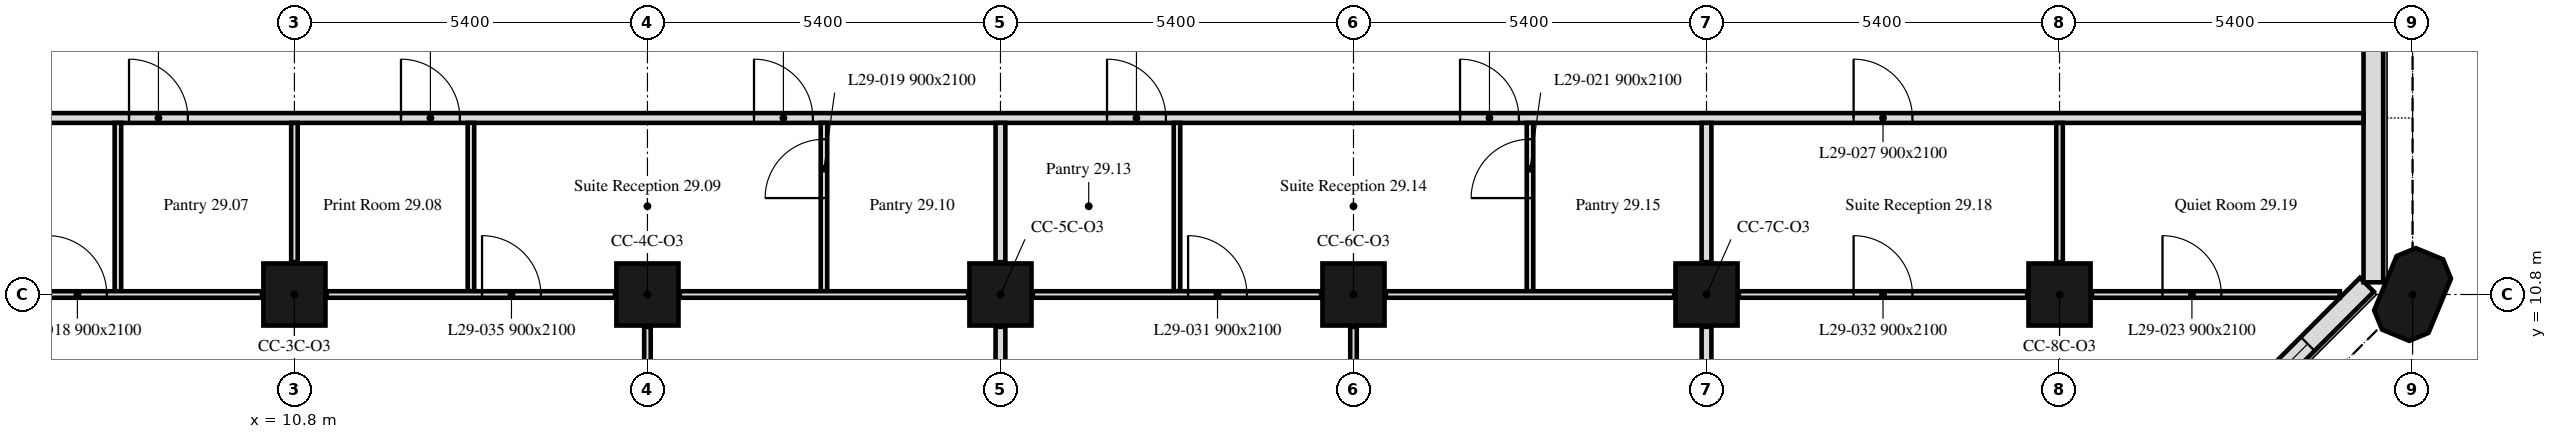
"""IFC4 building model, lengths in metres.
Left out: names, types, materials, properties, quantities, classifications, styles, units other than length and angle.
Written with IfcOpenShell. Run it as: python <this file> out.ifc"""

import sys

from ifc_helpers import new_model, si_unit, direction, frame, frame_2d, origin, origin_2d, place, context, subcontext, project, spatial, polyline, rectangle, outline, extrude, element, fill, save


model = new_model("IFC4")
c1 = context("Model", 3, precision=1e-05, world=origin(), true_north=direction((0.0, 1.0)))
c2 = subcontext(c1, "Body", "Model", "MODEL_VIEW")
j1 = project(units=[si_unit("LENGTHUNIT", "METRE"), si_unit("PLANEANGLEUNIT", "RADIAN")], contexts=[c1])
p1 = place(None, origin())
s1 = spatial("IfcSite", under=j1, at=p1, CompositionType="ELEMENT")
p2 = place(p1, origin())
s2 = spatial("IfcBuilding", under=s1, at=p2, CompositionType="ELEMENT")
p3 = place(p2, frame((0.0, 0.0, 122.0)))
s3 = spatial("IfcBuildingStorey", under=s2, at=p3, CompositionType="ELEMENT", Elevation=122.0)
for number, where, z_axis, x_axis in (
    (1, (10.8, 10.8, 0.0), (0.0, 0.0, 1.0), (1.0, 0.0, 0.0)),
    (2, (16.2, 10.8, 0.0), (0.0, 0.0, 1.0), (1.0, 0.0, 0.0)),
    (3, (21.6, 10.8, 0.0), (0.0, 0.0, 1.0), (1.0, 0.0, 0.0)),
    (4, (27.0, 10.8, 0.0), (0.0, 0.0, 1.0), (1.0, 0.0, 0.0)),
    (5, (32.4, 10.8, 0.0), (0.0, 0.0, 1.0), (1.0, 0.0, 0.0)),
    (6, (37.8, 10.8, 0.0), (0.0, 0.0, 1.0), (1.0, 0.0, 0.0)),
):
    element("IfcColumn", number, at=place(p3, frame(where, z_axis=z_axis, x_axis=x_axis)), inside=s3, PredefinedType="COLUMN", context=c2, shape_type="SweptSolid", body=[
        extrude(rectangle(XDim=0.95, YDim=0.95, at=origin_2d()), origin(), (0.0, 0.0, 1.0), 3.3),
    ])
p4 = place(p3, frame((43.2, 10.8, 0.0), z_axis=(0.0, 0.0, 1.0), x_axis=(0.382683432365, 0.923879532511, 0.0)))
e7 = element("IfcColumn", 7, at=p4, inside=s3, PredefinedType="COLUMN", context=c2, shape_type="SweptSolid", body=[
    extrude(outline(polyline([(-0.45, -0.45), (0.45, -0.45), (0.675, -0.225), (0.675, 0.225), (0.45, 0.45), (-0.45, 0.45), (-0.675, 0.225), (-0.675, -0.225), (-0.45, -0.45)])), origin(), (0.0, 0.0, 1.0), 3.3),
])
p5 = place(p3, frame((37.65, 6.099, 0.0), z_axis=(0.0, 0.0, 1.0), x_axis=(0.707106781187, 0.707106781187, 0.0)))
e8 = element("IfcWall", 8, at=p5, inside=s3, PredefinedType="SOLIDWALL", context=c2, shape_type="SweptSolid", body=[
    extrude(rectangle(XDim=6.86, YDim=0.3, at=frame_2d((3.43, 0.0))), origin(), (0.0, 0.0, 1.0), 3.3),
])
p6 = place(p5, frame((1.28, 0.0, 0.9)))
e9 = element("IfcOpeningElement", 9, at=p6, cuts=e8, PredefinedType="OPENING", context=c2, shape_type="SweptSolid", body=[
    extrude(rectangle(XDim=1.1, YDim=1.7, at=frame_2d((0.55, 0.85))), frame((0.0, 0.16, 0.0), z_axis=(0.0, -1.0, 0.0), x_axis=(1.0, 0.0, 0.0)), (0.0, 0.0, 1.0), 0.32),
])
p7 = place(p5, frame((4.48, 0.0, 0.9)))
e10 = element("IfcOpeningElement", 10, at=p7, cuts=e8, PredefinedType="OPENING", context=c2, shape_type="SweptSolid", body=[
    extrude(rectangle(XDim=1.1, YDim=1.7, at=frame_2d((0.55, 0.85))), frame((0.0, 0.16, 0.0), z_axis=(0.0, -1.0, 0.0), x_axis=(1.0, 0.0, 0.0)), (0.0, 0.0, 1.0), 0.32),
])
p8 = place(p3, frame((42.6, 10.986, 0.0), z_axis=(0.0, 0.0, 1.0), x_axis=(0.0, 1.0, 0.0)))
e11 = element("IfcWall", 11, at=p8, inside=s3, PredefinedType="SOLIDWALL", context=c2, shape_type="SweptSolid", body=[
    extrude(rectangle(XDim=5.214, YDim=0.3, at=frame_2d((2.607, 0.0))), origin(), (0.0, 0.0, 1.0), 3.3),
])
p9 = place(p3, frame((0.751, 13.5, 0.0), z_axis=(0.0, 0.0, 1.0), x_axis=(1.0, 0.0, 0.0)))
e12 = element("IfcWall", 12, at=p9, inside=s3, PredefinedType="PARTITIONING", context=c2, shape_type="SweptSolid", body=[
    extrude(rectangle(XDim=41.698, YDim=0.15, at=frame_2d((20.849, 0.0))), origin(), (0.0, 0.0, 1.0), 2.55),
])
p10 = place(p9, frame((0.879, 0.0, 0.0)))
e13 = element("IfcOpeningElement", 13, at=p10, cuts=e12, PredefinedType="OPENING", context=c2, shape_type="SweptSolid", body=[
    extrude(rectangle(XDim=0.9, YDim=2.1, at=frame_2d((0.45, 1.05))), frame((0.0, 0.075, 0.0), z_axis=(0.0, -1.0, 0.0), x_axis=(1.0, 0.0, 0.0)), (0.0, 0.0, 1.0), 0.15),
])
p11 = place(p9, frame((7.519, 0.0, 0.0)))
e14 = element("IfcOpeningElement", 14, at=p11, cuts=e12, PredefinedType="OPENING", context=c2, shape_type="SweptSolid", body=[
    extrude(rectangle(XDim=0.9, YDim=2.1, at=frame_2d((0.45, 1.05))), frame((0.0, 0.075, 0.0), z_axis=(0.0, -1.0, 0.0), x_axis=(1.0, 0.0, 0.0)), (0.0, 0.0, 1.0), 0.15),
])
p12 = place(p9, frame((11.679, 0.0, 0.0)))
e15 = element("IfcOpeningElement", 15, at=p12, cuts=e12, PredefinedType="OPENING", context=c2, shape_type="SweptSolid", body=[
    extrude(rectangle(XDim=0.9, YDim=2.1, at=frame_2d((0.45, 1.05))), frame((0.0, 0.075, 0.0), z_axis=(0.0, -1.0, 0.0), x_axis=(1.0, 0.0, 0.0)), (0.0, 0.0, 1.0), 0.15),
])
p13 = place(p9, frame((22.479, 0.0, 0.0)))
e16 = element("IfcOpeningElement", 16, at=p13, cuts=e12, PredefinedType="OPENING", context=c2, shape_type="SweptSolid", body=[
    extrude(rectangle(XDim=0.9, YDim=2.1, at=frame_2d((0.45, 1.05))), frame((0.0, 0.075, 0.0), z_axis=(0.0, -1.0, 0.0), x_axis=(1.0, 0.0, 0.0)), (0.0, 0.0, 1.0), 0.15),
])
p14 = place(p9, frame((33.899, 0.0, 0.0)))
e17 = element("IfcOpeningElement", 17, at=p14, cuts=e12, PredefinedType="OPENING", context=c2, shape_type="SweptSolid", body=[
    extrude(rectangle(XDim=0.9, YDim=2.1, at=frame_2d((0.45, 1.05))), frame((0.0, 0.075, 0.0), z_axis=(0.0, -1.0, 0.0), x_axis=(1.0, 0.0, 0.0)), (0.0, 0.0, 1.0), 0.15),
])
p15 = place(p9, frame((17.079, 0.0, 0.0)))
e18 = element("IfcOpeningElement", 18, at=p15, cuts=e12, PredefinedType="OPENING", context=c2, shape_type="SweptSolid", body=[
    extrude(rectangle(XDim=0.9, YDim=2.1, at=frame_2d((0.45, 1.05))), frame((0.0, 0.075, 0.0), z_axis=(0.0, -1.0, 0.0), x_axis=(1.0, 0.0, 0.0)), (0.0, 0.0, 1.0), 0.15),
])
p16 = place(p9, frame((27.879, 0.0, 0.0)))
e19 = element("IfcOpeningElement", 19, at=p16, cuts=e12, PredefinedType="OPENING", context=c2, shape_type="SweptSolid", body=[
    extrude(rectangle(XDim=0.9, YDim=2.1, at=frame_2d((0.45, 1.05))), frame((0.0, 0.075, 0.0), z_axis=(0.0, -1.0, 0.0), x_axis=(1.0, 0.0, 0.0)), (0.0, 0.0, 1.0), 0.15),
])
p17 = place(p3, frame((8.1, 10.85, 0.0), z_axis=(0.0, 0.0, 1.0), x_axis=(0.0, 1.0, 0.0)))
e20 = element("IfcWall", 20, at=p17, inside=s3, PredefinedType="PARTITIONING", context=c2, shape_type="SweptSolid", body=[
    extrude(rectangle(XDim=2.575, YDim=0.1, at=frame_2d((1.288, 0.0))), origin(), (0.0, 0.0, 1.0), 3.3),
])
p18 = place(p3, frame((5.895, 10.8, 0.0), z_axis=(0.0, 0.0, 1.0), x_axis=(1.0, 0.0, 0.0)))
e21 = element("IfcWall", 21, at=p18, inside=s3, PredefinedType="PARTITIONING", context=c2, shape_type="SweptSolid", body=[
    extrude(rectangle(XDim=4.41, YDim=0.1, at=frame_2d((2.205, 0.0))), origin(), (0.0, 0.0, 1.0), 2.55),
])
p19 = place(p18, frame((1.135, 0.0, 0.0)))
e22 = element("IfcOpeningElement", 22, at=p19, cuts=e21, PredefinedType="OPENING", context=c2, shape_type="SweptSolid", body=[
    extrude(rectangle(XDim=0.9, YDim=2.1, at=frame_2d((0.45, 1.05))), frame((0.0, 0.05, 0.0), z_axis=(0.0, -1.0, 0.0), x_axis=(1.0, 0.0, 0.0)), (0.0, 0.0, 1.0), 0.1),
])
p20 = place(p3, frame((10.8, 11.295, 0.0), z_axis=(0.0, 0.0, 1.0), x_axis=(0.0, 1.0, 0.0)))
e23 = element("IfcWall", 23, at=p20, inside=s3, PredefinedType="PARTITIONING", context=c2, shape_type="SweptSolid", body=[
    extrude(rectangle(XDim=2.13, YDim=0.1, at=frame_2d((1.065, 0.0))), origin(), (0.0, 0.0, 1.0), 2.55),
])
p21 = place(p3, frame((13.5, 10.85, 0.0), z_axis=(0.0, 0.0, 1.0), x_axis=(0.0, 1.0, 0.0)))
e24 = element("IfcWall", 24, at=p21, inside=s3, PredefinedType="PARTITIONING", context=c2, shape_type="SweptSolid", body=[
    extrude(rectangle(XDim=2.575, YDim=0.1, at=frame_2d((1.288, 0.0))), origin(), (0.0, 0.0, 1.0), 3.3),
])
p22 = place(p3, frame((11.295, 10.8, 0.0), z_axis=(0.0, 0.0, 1.0), x_axis=(1.0, 0.0, 0.0)))
e25 = element("IfcWall", 25, at=p22, inside=s3, PredefinedType="PARTITIONING", context=c2, shape_type="SweptSolid", body=[
    extrude(rectangle(XDim=4.41, YDim=0.1, at=frame_2d((2.205, 0.0))), origin(), (0.0, 0.0, 1.0), 2.55),
])
p23 = place(p22, frame((2.375, 0.0, 0.0)))
e26 = element("IfcOpeningElement", 26, at=p23, cuts=e25, PredefinedType="OPENING", context=c2, shape_type="SweptSolid", body=[
    extrude(rectangle(XDim=0.9, YDim=2.1, at=frame_2d((0.45, 1.05))), frame((0.0, 0.05, 0.0), z_axis=(0.0, -1.0, 0.0), x_axis=(1.0, 0.0, 0.0)), (0.0, 0.0, 1.0), 0.1),
])
p24 = place(p3, frame((18.9, 10.85, 0.0), z_axis=(0.0, 0.0, 1.0), x_axis=(0.0, 1.0, 0.0)))
e27 = element("IfcWall", 27, at=p24, inside=s3, PredefinedType="PARTITIONING", context=c2, shape_type="SweptSolid", body=[
    extrude(rectangle(XDim=2.575, YDim=0.1, at=frame_2d((1.288, 0.0))), origin(), (0.0, 0.0, 1.0), 3.3),
])
p25 = place(p24, frame((1.425, 0.0, 0.0)))
e28 = element("IfcOpeningElement", 28, at=p25, cuts=e27, PredefinedType="OPENING", context=c2, shape_type="SweptSolid", body=[
    extrude(rectangle(XDim=0.9, YDim=2.1, at=frame_2d((0.45, 1.05))), frame((0.0, 0.05, 0.0), z_axis=(0.0, -1.0, 0.0), x_axis=(1.0, 0.0, 0.0)), (0.0, 0.0, 1.0), 0.1),
])
p26 = place(p3, frame((16.695, 10.8, 0.0), z_axis=(0.0, 0.0, 1.0), x_axis=(1.0, 0.0, 0.0)))
e29 = element("IfcWall", 29, at=p26, inside=s3, PredefinedType="PARTITIONING", context=c2, shape_type="SweptSolid", body=[
    extrude(rectangle(XDim=4.41, YDim=0.1, at=frame_2d((2.205, 0.0))), origin(), (0.0, 0.0, 1.0), 3.3),
])
p27 = place(p3, frame((21.6, 11.295, 0.0), z_axis=(0.0, 0.0, 1.0), x_axis=(0.0, 1.0, 0.0)))
e30 = element("IfcWall", 30, at=p27, inside=s3, PredefinedType="PARTITIONING", context=c2, shape_type="SweptSolid", body=[
    extrude(rectangle(XDim=2.13, YDim=0.15, at=frame_2d((1.065, 0.0))), origin(), (0.0, 0.0, 1.0), 2.55),
])
p28 = place(p3, frame((16.2, 6.151, 0.0), z_axis=(0.0, 0.0, 1.0), x_axis=(0.0, 1.0, 0.0)))
e31 = element("IfcWall", 31, at=p28, inside=s3, PredefinedType="PARTITIONING", context=c2, shape_type="SweptSolid", body=[
    extrude(rectangle(XDim=4.154, YDim=0.1, at=frame_2d((2.077, 0.0))), origin(), (0.0, 0.0, 1.0), 2.55),
])
p29 = place(p28, frame((1.724, 0.0, 0.0)))
e32 = element("IfcOpeningElement", 32, at=p29, cuts=e31, PredefinedType="OPENING", context=c2, shape_type="SweptSolid", body=[
    extrude(rectangle(XDim=0.9, YDim=2.1, at=frame_2d((0.45, 1.05))), frame((0.0, 0.05, 0.0), z_axis=(0.0, -1.0, 0.0), x_axis=(1.0, 0.0, 0.0)), (0.0, 0.0, 1.0), 0.1),
])
p30 = place(p3, frame((21.6, 6.151, 0.0), z_axis=(0.0, 0.0, 1.0), x_axis=(0.0, 1.0, 0.0)))
e33 = element("IfcWall", 33, at=p30, inside=s3, PredefinedType="PARTITIONING", context=c2, shape_type="SweptSolid", body=[
    extrude(rectangle(XDim=4.154, YDim=0.15, at=frame_2d((2.077, 0.0))), origin(), (0.0, 0.0, 1.0), 2.55),
])
p31 = place(p3, frame((24.3, 10.85, 0.0), z_axis=(0.0, 0.0, 1.0), x_axis=(0.0, 1.0, 0.0)))
e34 = element("IfcWall", 34, at=p31, inside=s3, PredefinedType="PARTITIONING", context=c2, shape_type="SweptSolid", body=[
    extrude(rectangle(XDim=2.575, YDim=0.1, at=frame_2d((1.288, 0.0))), origin(), (0.0, 0.0, 1.0), 3.3),
])
p32 = place(p3, frame((22.095, 10.8, 0.0), z_axis=(0.0, 0.0, 1.0), x_axis=(1.0, 0.0, 0.0)))
e35 = element("IfcWall", 35, at=p32, inside=s3, PredefinedType="PARTITIONING", context=c2, shape_type="SweptSolid", body=[
    extrude(rectangle(XDim=4.41, YDim=0.1, at=frame_2d((2.205, 0.0))), origin(), (0.0, 0.0, 1.0), 3.3),
])
p33 = place(p32, frame((2.375, 0.0, 0.0)))
e36 = element("IfcOpeningElement", 36, at=p33, cuts=e35, PredefinedType="OPENING", context=c2, shape_type="SweptSolid", body=[
    extrude(rectangle(XDim=0.9, YDim=2.1, at=frame_2d((0.45, 1.05))), frame((0.0, 0.05, 0.0), z_axis=(0.0, -1.0, 0.0), x_axis=(1.0, 0.0, 0.0)), (0.0, 0.0, 1.0), 0.1),
])
p34 = place(p3, frame((29.7, 10.85, 0.0), z_axis=(0.0, 0.0, 1.0), x_axis=(0.0, 1.0, 0.0)))
e37 = element("IfcWall", 37, at=p34, inside=s3, PredefinedType="PARTITIONING", context=c2, shape_type="SweptSolid", body=[
    extrude(rectangle(XDim=2.575, YDim=0.1, at=frame_2d((1.288, 0.0))), origin(), (0.0, 0.0, 1.0), 3.3),
])
p35 = place(p34, frame((1.425, 0.0, 0.0)))
e38 = element("IfcOpeningElement", 38, at=p35, cuts=e37, PredefinedType="OPENING", context=c2, shape_type="SweptSolid", body=[
    extrude(rectangle(XDim=0.9, YDim=2.1, at=frame_2d((0.45, 1.05))), frame((0.0, 0.05, 0.0), z_axis=(0.0, -1.0, 0.0), x_axis=(1.0, 0.0, 0.0)), (0.0, 0.0, 1.0), 0.1),
])
p36 = place(p3, frame((27.495, 10.8, 0.0), z_axis=(0.0, 0.0, 1.0), x_axis=(1.0, 0.0, 0.0)))
e39 = element("IfcWall", 39, at=p36, inside=s3, PredefinedType="PARTITIONING", context=c2, shape_type="SweptSolid", body=[
    extrude(rectangle(XDim=4.41, YDim=0.1, at=frame_2d((2.205, 0.0))), origin(), (0.0, 0.0, 1.0), 3.3),
])
p37 = place(p3, frame((32.4, 11.295, 0.0), z_axis=(0.0, 0.0, 1.0), x_axis=(0.0, 1.0, 0.0)))
e40 = element("IfcWall", 40, at=p37, inside=s3, PredefinedType="PARTITIONING", context=c2, shape_type="SweptSolid", body=[
    extrude(rectangle(XDim=2.13, YDim=0.15, at=frame_2d((1.065, 0.0))), origin(), (0.0, 0.0, 1.0), 2.55),
])
p38 = place(p3, frame((27.0, 6.151, 0.0), z_axis=(0.0, 0.0, 1.0), x_axis=(0.0, 1.0, 0.0)))
e41 = element("IfcWall", 41, at=p38, inside=s3, PredefinedType="PARTITIONING", context=c2, shape_type="SweptSolid", body=[
    extrude(rectangle(XDim=4.154, YDim=0.1, at=frame_2d((2.077, 0.0))), origin(), (0.0, 0.0, 1.0), 2.55),
])
p39 = place(p38, frame((1.724, 0.0, 0.0)))
e42 = element("IfcOpeningElement", 42, at=p39, cuts=e41, PredefinedType="OPENING", context=c2, shape_type="SweptSolid", body=[
    extrude(rectangle(XDim=0.9, YDim=2.1, at=frame_2d((0.45, 1.05))), frame((0.0, 0.05, 0.0), z_axis=(0.0, -1.0, 0.0), x_axis=(1.0, 0.0, 0.0)), (0.0, 0.0, 1.0), 0.1),
])
p40 = place(p3, frame((32.4, 6.151, 0.0), z_axis=(0.0, 0.0, 1.0), x_axis=(0.0, 1.0, 0.0)))
e43 = element("IfcWall", 43, at=p40, inside=s3, PredefinedType="PARTITIONING", context=c2, shape_type="SweptSolid", body=[
    extrude(rectangle(XDim=4.154, YDim=0.15, at=frame_2d((2.077, 0.0))), origin(), (0.0, 0.0, 1.0), 2.55),
])
p41 = place(p3, frame((32.895, 10.8, 0.0), z_axis=(0.0, 0.0, 1.0), x_axis=(1.0, 0.0, 0.0)))
e44 = element("IfcWall", 44, at=p41, inside=s3, PredefinedType="PARTITIONING", context=c2, shape_type="SweptSolid", body=[
    extrude(rectangle(XDim=4.41, YDim=0.1, at=frame_2d((2.205, 0.0))), origin(), (0.0, 0.0, 1.0), 3.3),
])
p42 = place(p41, frame((1.755, 0.0, 0.0)))
e45 = element("IfcOpeningElement", 45, at=p42, cuts=e44, PredefinedType="OPENING", context=c2, shape_type="SweptSolid", body=[
    extrude(rectangle(XDim=0.9, YDim=2.1, at=frame_2d((0.45, 1.05))), frame((0.0, 0.05, 0.0), z_axis=(0.0, -1.0, 0.0), x_axis=(1.0, 0.0, 0.0)), (0.0, 0.0, 1.0), 0.1),
])
p43 = place(p3, frame((37.8, 11.295, 0.0), z_axis=(0.0, 0.0, 1.0), x_axis=(0.0, 1.0, 0.0)))
e46 = element("IfcWall", 46, at=p43, inside=s3, PredefinedType="PARTITIONING", context=c2, shape_type="SweptSolid", body=[
    extrude(rectangle(XDim=2.13, YDim=0.1, at=frame_2d((1.065, 0.0))), origin(), (0.0, 0.0, 1.0), 3.3),
])
p44 = place(p3, frame((38.295, 10.8, 0.0), z_axis=(0.0, 0.0, 1.0), x_axis=(1.0, 0.0, 0.0)))
e47 = element("IfcWall", 47, at=p44, inside=s3, PredefinedType="PARTITIONING", context=c2, shape_type="SweptSolid", body=[
    extrude(rectangle(XDim=3.793, YDim=0.1, at=frame_2d((1.896, 0.0))), origin(), (0.0, 0.0, 1.0), 3.3),
])
p45 = place(p44, frame((1.08, 0.0, 0.0)))
e48 = element("IfcOpeningElement", 48, at=p45, cuts=e47, PredefinedType="OPENING", context=c2, shape_type="SweptSolid", body=[
    extrude(rectangle(XDim=0.9, YDim=2.1, at=frame_2d((0.45, 1.05))), frame((0.0, 0.05, 0.0), z_axis=(0.0, -1.0, 0.0), x_axis=(1.0, 0.0, 0.0)), (0.0, 0.0, 1.0), 0.1),
])
p46 = place(p7, origin())
e49 = element("IfcWindow", 49, at=p46, inside=s3, PartitioningType="SINGLE_PANEL", PredefinedType="WINDOW", context=c2, shape_type="SweptSolid", body=[
    extrude(rectangle(XDim=1.1, YDim=1.7, at=frame_2d((0.55, 0.85))), frame((0.0, 0.03, 0.0), z_axis=(0.0, -1.0, 0.0), x_axis=(1.0, 0.0, 0.0)), (0.0, 0.0, 1.0), 0.06),
])
fill(e10, e49)
p47 = place(p11, origin())
e50 = element("IfcDoor", 50, at=p47, inside=s3, OperationType="SINGLE_SWING_RIGHT", PredefinedType="DOOR", context=c2, shape_type="SweptSolid", body=[
    extrude(rectangle(XDim=0.9, YDim=2.1, at=frame_2d((0.45, 1.05))), frame((0.0, 0.025, 0.0), z_axis=(0.0, -1.0, 0.0), x_axis=(1.0, 0.0, 0.0)), (0.0, 0.0, 1.0), 0.05),
])
fill(e14, e50)
p48 = place(p12, origin())
e51 = element("IfcDoor", 51, at=p48, inside=s3, OperationType="SINGLE_SWING_RIGHT", PredefinedType="DOOR", context=c2, shape_type="SweptSolid", body=[
    extrude(rectangle(XDim=0.9, YDim=2.1, at=frame_2d((0.45, 1.05))), frame((0.0, 0.025, 0.0), z_axis=(0.0, -1.0, 0.0), x_axis=(1.0, 0.0, 0.0)), (0.0, 0.0, 1.0), 0.05),
])
fill(e15, e51)
p49 = place(p13, origin())
e52 = element("IfcDoor", 52, at=p49, inside=s3, OperationType="SINGLE_SWING_RIGHT", PredefinedType="DOOR", context=c2, shape_type="SweptSolid", body=[
    extrude(rectangle(XDim=0.9, YDim=2.1, at=frame_2d((0.45, 1.05))), frame((0.0, 0.025, 0.0), z_axis=(0.0, -1.0, 0.0), x_axis=(1.0, 0.0, 0.0)), (0.0, 0.0, 1.0), 0.05),
])
fill(e16, e52)
p50 = place(p19, origin())
e53 = element("IfcDoor", 53, at=p50, inside=s3, OperationType="SINGLE_SWING_LEFT", PredefinedType="DOOR", context=c2, shape_type="SweptSolid", body=[
    extrude(rectangle(XDim=0.9, YDim=2.1, at=frame_2d((0.45, 1.05))), frame((0.0, 0.025, 0.0), z_axis=(0.0, -1.0, 0.0), x_axis=(1.0, 0.0, 0.0)), (0.0, 0.0, 1.0), 0.05),
])
fill(e22, e53)
p51 = place(p25, origin())
e54 = element("IfcDoor", 54, at=p51, inside=s3, OperationType="SINGLE_SWING_LEFT", PredefinedType="DOOR", context=c2, shape_type="SweptSolid", body=[
    extrude(rectangle(XDim=0.9, YDim=2.1, at=frame_2d((0.45, 1.05))), frame((0.0, 0.025, 0.0), z_axis=(0.0, -1.0, 0.0), x_axis=(1.0, 0.0, 0.0)), (0.0, 0.0, 1.0), 0.05),
])
fill(e28, e54)
p52 = place(p35, origin())
e55 = element("IfcDoor", 55, at=p52, inside=s3, OperationType="SINGLE_SWING_RIGHT", PredefinedType="DOOR", context=c2, shape_type="SweptSolid", body=[
    extrude(rectangle(XDim=0.9, YDim=2.1, at=frame_2d((0.45, 1.05))), frame((0.0, 0.025, 0.0), z_axis=(0.0, -1.0, 0.0), x_axis=(1.0, 0.0, 0.0)), (0.0, 0.0, 1.0), 0.05),
])
fill(e38, e55)
p53 = place(p45, origin())
e56 = element("IfcDoor", 56, at=p53, inside=s3, OperationType="SINGLE_SWING_RIGHT", PredefinedType="DOOR", context=c2, shape_type="SweptSolid", body=[
    extrude(rectangle(XDim=0.9, YDim=2.1, at=frame_2d((0.45, 1.05))), frame((0.0, 0.025, 0.0), z_axis=(0.0, -1.0, 0.0), x_axis=(1.0, 0.0, 0.0)), (0.0, 0.0, 1.0), 0.05),
])
fill(e48, e56)
p54 = place(p14, origin())
e57 = element("IfcDoor", 57, at=p54, inside=s3, OperationType="SINGLE_SWING_RIGHT", PredefinedType="DOOR", context=c2, shape_type="SweptSolid", body=[
    extrude(rectangle(XDim=0.9, YDim=2.1, at=frame_2d((0.45, 1.05))), frame((0.0, 0.025, 0.0), z_axis=(0.0, -1.0, 0.0), x_axis=(1.0, 0.0, 0.0)), (0.0, 0.0, 1.0), 0.05),
])
fill(e17, e57)
p55 = place(p33, origin())
e58 = element("IfcDoor", 58, at=p55, inside=s3, OperationType="SINGLE_SWING_LEFT", PredefinedType="DOOR", context=c2, shape_type="SweptSolid", body=[
    extrude(rectangle(XDim=0.9, YDim=2.1, at=frame_2d((0.45, 1.05))), frame((0.0, 0.025, 0.0), z_axis=(0.0, -1.0, 0.0), x_axis=(1.0, 0.0, 0.0)), (0.0, 0.0, 1.0), 0.05),
])
fill(e36, e58)
p56 = place(p42, origin())
e59 = element("IfcDoor", 59, at=p56, inside=s3, OperationType="SINGLE_SWING_LEFT", PredefinedType="DOOR", context=c2, shape_type="SweptSolid", body=[
    extrude(rectangle(XDim=0.9, YDim=2.1, at=frame_2d((0.45, 1.05))), frame((0.0, 0.025, 0.0), z_axis=(0.0, -1.0, 0.0), x_axis=(1.0, 0.0, 0.0)), (0.0, 0.0, 1.0), 0.05),
])
fill(e45, e59)
p57 = place(p15, origin())
e60 = element("IfcDoor", 60, at=p57, inside=s3, OperationType="SINGLE_SWING_LEFT", PredefinedType="DOOR", context=c2, shape_type="SweptSolid", body=[
    extrude(rectangle(XDim=0.9, YDim=2.1, at=frame_2d((0.45, 1.05))), frame((0.0, 0.025, 0.0), z_axis=(0.0, -1.0, 0.0), x_axis=(1.0, 0.0, 0.0)), (0.0, 0.0, 1.0), 0.05),
])
fill(e18, e60)
p58 = place(p16, origin())
e61 = element("IfcDoor", 61, at=p58, inside=s3, OperationType="SINGLE_SWING_RIGHT", PredefinedType="DOOR", context=c2, shape_type="SweptSolid", body=[
    extrude(rectangle(XDim=0.9, YDim=2.1, at=frame_2d((0.45, 1.05))), frame((0.0, 0.025, 0.0), z_axis=(0.0, -1.0, 0.0), x_axis=(1.0, 0.0, 0.0)), (0.0, 0.0, 1.0), 0.05),
])
fill(e19, e61)
p59 = place(p23, origin())
e62 = element("IfcDoor", 62, at=p59, inside=s3, OperationType="SINGLE_SWING_LEFT", PredefinedType="DOOR", context=c2, shape_type="SweptSolid", body=[
    extrude(rectangle(XDim=0.9, YDim=2.1, at=frame_2d((0.45, 1.05))), frame((0.0, 0.025, 0.0), z_axis=(0.0, -1.0, 0.0), x_axis=(1.0, 0.0, 0.0)), (0.0, 0.0, 1.0), 0.05),
])
fill(e26, e62)
save(model, sys.argv[1])
